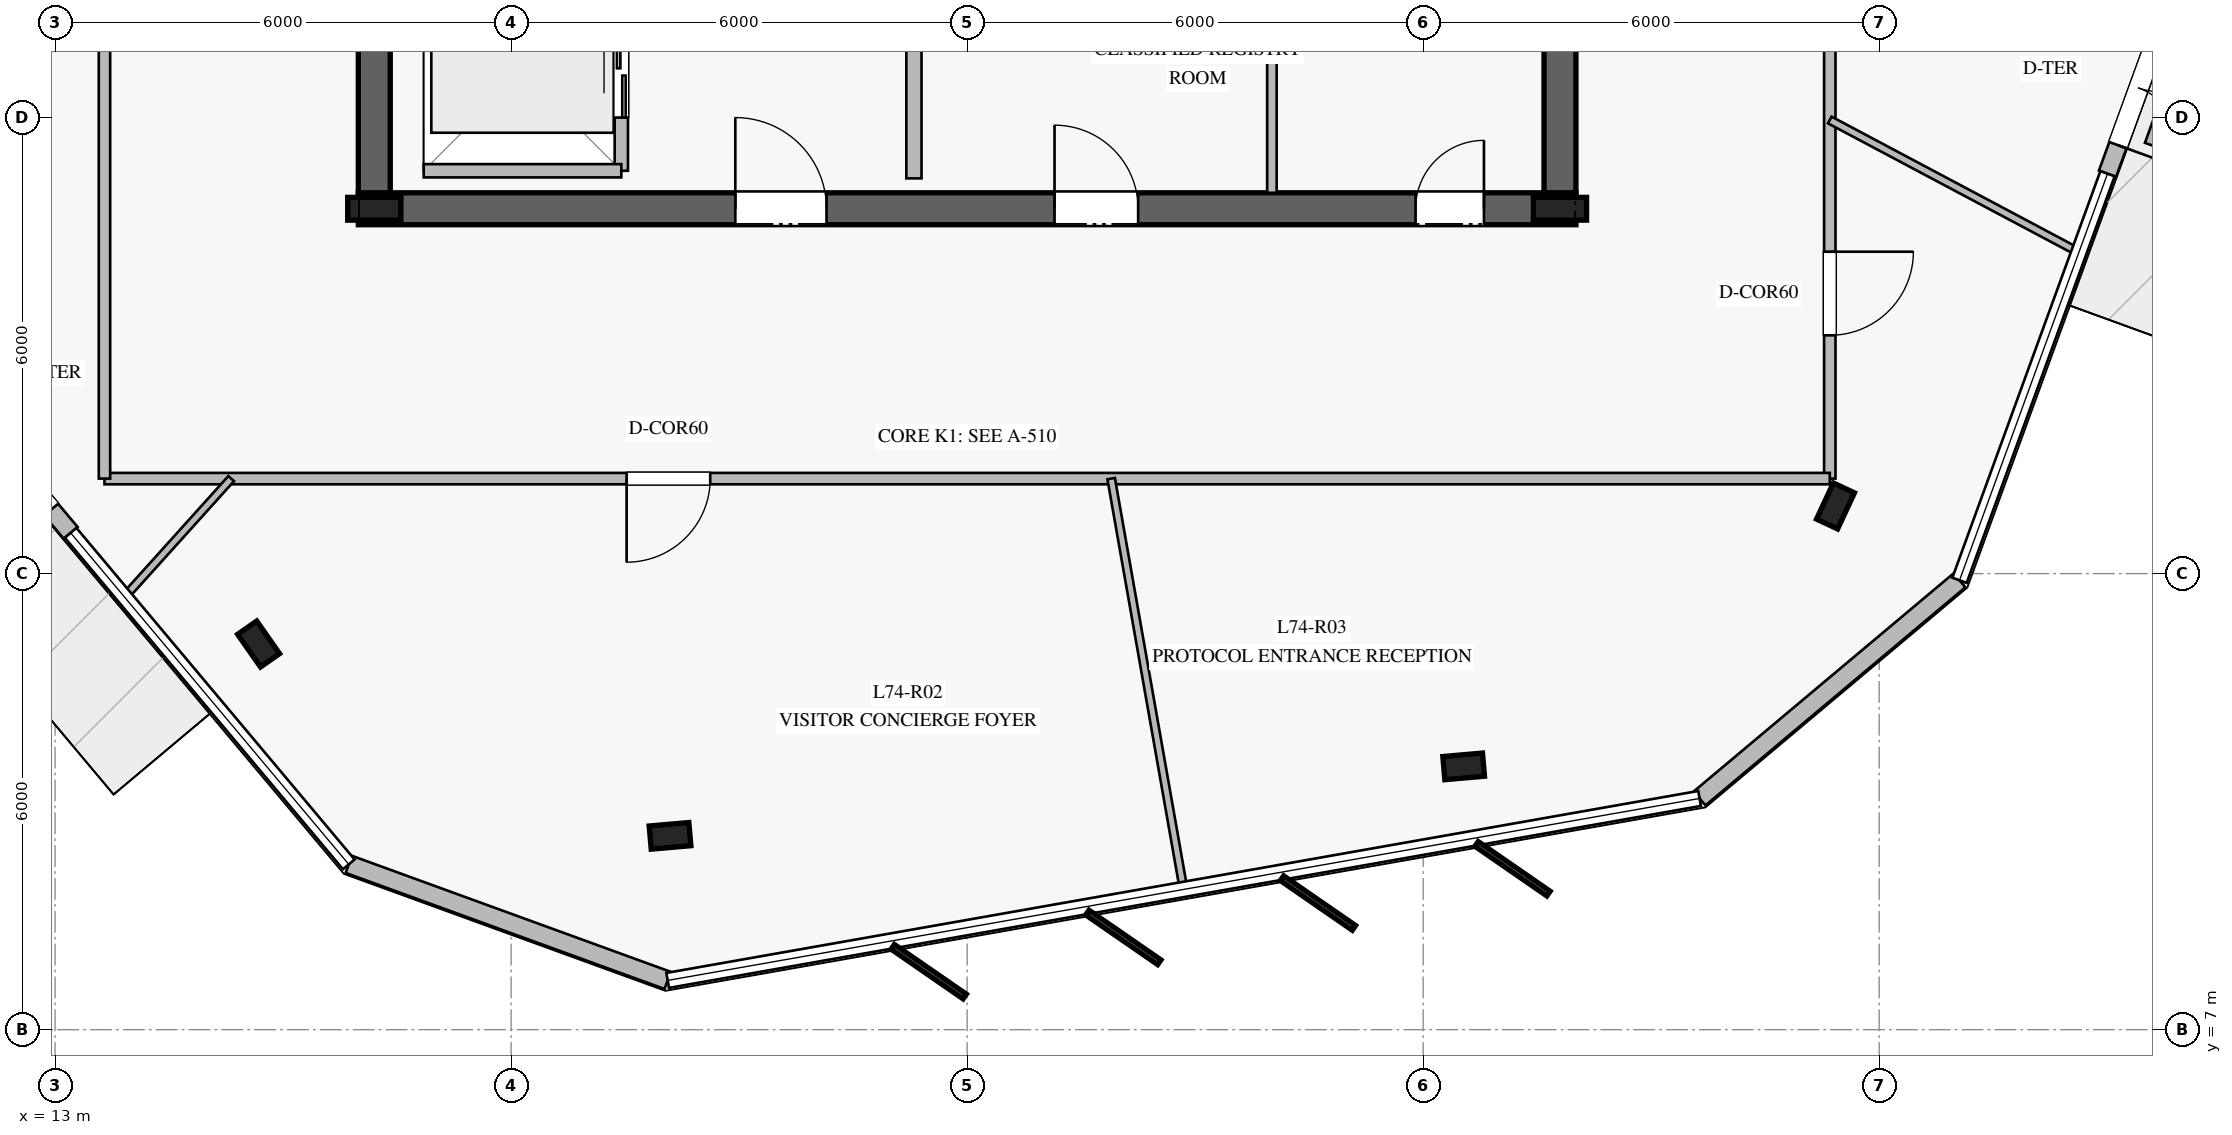
"""IFC4 building model, lengths in metres.
Left out: names, types, materials, properties, quantities, classifications, styles, units other than length and angle.
Written with IfcOpenShell. Run it as: python <this file> out.ifc"""

import sys

from ifc_helpers import new_model, si_unit, direction, frame, frame_2d, origin, origin_2d, place, context, subcontext, project, spatial, rectangle, i_section, extrude, element, fill, save


model = new_model("IFC4")
c1 = context("Model", 3, precision=1e-05, world=origin(), true_north=direction((0.0, 1.0)))
c2 = subcontext(c1, "Body", "Model", "MODEL_VIEW")
j1 = project(units=[si_unit("LENGTHUNIT", "METRE"), si_unit("PLANEANGLEUNIT", "RADIAN")], contexts=[c1])
p1 = place(None, origin())
s1 = spatial("IfcSite", under=j1, at=p1, CompositionType="ELEMENT")
p2 = place(p1, origin())
s2 = spatial("IfcBuilding", under=s1, at=p2, CompositionType="ELEMENT")
p3 = place(p2, frame((0.0, 0.0, 306.2)))
s3 = spatial("IfcBuildingStorey", under=s2, at=p3, CompositionType="ELEMENT", Elevation=306.2)
p4 = place(p3, frame((16.99, 17.8, 0.0), z_axis=(0.0, 0.0, 1.0), x_axis=(1.0, 0.0, 0.0)))
e1 = element("IfcWall", 1, at=p4, inside=s3, PredefinedType="SHEAR", context=c2, shape_type="SweptSolid", body=[
    extrude(rectangle(XDim=16.02, YDim=0.42, at=frame_2d((8.01, 0.0))), origin(), (0.0, 0.0, 1.0), 3.78),
])
p5 = place(p4, frame((4.96, 0.0, 0.0)))
e2 = element("IfcOpeningElement", 2, at=p5, cuts=e1, PredefinedType="OPENING", context=c2, shape_type="SweptSolid", body=[
    extrude(rectangle(XDim=1.2, YDim=2.25, at=frame_2d((0.6, 1.125))), frame((0.0, 0.22, 0.0), z_axis=(0.0, -1.0, 0.0), x_axis=(1.0, 0.0, 0.0)), (0.0, 0.0, 1.0), 0.44),
])
p6 = place(p4, frame((13.91, 0.0, 0.0)))
e3 = element("IfcOpeningElement", 3, at=p6, cuts=e1, PredefinedType="OPENING", context=c2, shape_type="SweptSolid", body=[
    extrude(rectangle(XDim=0.9, YDim=2.1, at=frame_2d((0.45, 1.05))), frame((0.0, 0.22, 0.0), z_axis=(0.0, -1.0, 0.0), x_axis=(1.0, 0.0, 0.0)), (0.0, 0.0, 1.0), 0.44),
])
p7 = place(p4, frame((9.16, 0.0, 0.0)))
e4 = element("IfcOpeningElement", 4, at=p7, cuts=e1, PredefinedType="OPENING", context=c2, shape_type="SweptSolid", body=[
    extrude(rectangle(XDim=1.1, YDim=2.2, at=frame_2d((0.55, 1.1))), frame((0.0, 0.22, 0.0), z_axis=(0.0, -1.0, 0.0), x_axis=(1.0, 0.0, 0.0)), (0.0, 0.0, 1.0), 0.44),
])
p8 = place(p3, frame((17.2, 31.99, 0.0), z_axis=(0.0, 0.0, 1.0), x_axis=(0.0, -1.0, 0.0)))
e5 = element("IfcWall", 5, at=p8, inside=s3, PredefinedType="SHEAR", context=c2, shape_type="SweptSolid", body=[
    extrude(rectangle(XDim=13.98, YDim=0.42, at=frame_2d((6.99, 0.0))), origin(), (0.0, 0.0, 1.0), 3.78),
])
p9 = place(p8, frame((2.14, 0.0, 0.0)))
e6 = element("IfcOpeningElement", 6, at=p9, cuts=e5, PredefinedType="OPENING", context=c2, shape_type="SweptSolid", body=[
    extrude(rectangle(XDim=1.5, YDim=2.2, at=frame_2d((0.75, 1.1))), frame((0.0, 0.22, 0.0), z_axis=(0.0, -1.0, 0.0), x_axis=(1.0, 0.0, 0.0)), (0.0, 0.0, 1.0), 0.44),
])
p10 = place(p3, frame((32.8, 18.01, 0.0), z_axis=(0.0, 0.0, 1.0), x_axis=(0.0, 1.0, 0.0)))
e7 = element("IfcWall", 7, at=p10, inside=s3, PredefinedType="SHEAR", context=c2, shape_type="SweptSolid", body=[
    extrude(rectangle(XDim=13.98, YDim=0.42, at=frame_2d((6.99, 0.0))), origin(), (0.0, 0.0, 1.0), 3.78),
])
for number, where, z_axis, x_axis in (
    (8, (17.2, 17.8, 0.0), (0.0, 0.0, 1.0), (1.0, 0.0, 0.0)),
    (9, (32.8, 17.8, 0.0), (0.0, 0.0, 1.0), (1.0, 0.0, 0.0)),
):
    element("IfcColumn", number, at=place(p3, frame(where, z_axis=z_axis, x_axis=x_axis)), inside=s3, PredefinedType="COLUMN", context=c2, shape_type="SweptSolid", body=[
        extrude(i_section(OverallWidth=0.3, OverallDepth=0.7, WebThickness=0.017, FlangeThickness=0.032, at=origin_2d()), origin(), (0.0, 0.0, 1.0), 4.0),
    ])
for number, where, z_axis, x_axis in (
    (10, (15.678, 12.074, 0.0), (0.0, 0.0, 1.0), (-0.574, 0.819, 0.0)),
    (11, (21.091, 9.55, 0.0), (0.0, 0.0, 1.0), (0.996, 0.087, 0.0)),
    (12, (31.533, 10.464, 0.0), (0.0, 0.0, 1.0), (0.996, 0.087, 0.0)),
    (13, (36.425, 13.89, 0.0), (0.0, 0.0, 1.0), (0.423, 0.906, 0.0)),
):
    element("IfcColumn", number, at=place(p3, frame(where, z_axis=z_axis, x_axis=x_axis)), inside=s3, PredefinedType="COLUMN", context=c2, shape_type="SweptSolid", body=[
        extrude(i_section(OverallWidth=0.306, OverallDepth=0.524, WebThickness=0.021, FlangeThickness=0.04, at=origin_2d()), origin(), (0.0, 0.0, 1.0), 4.0),
    ])
p11 = place(p3, frame((11.663, 15.374, 0.0), z_axis=(0.0, 0.0, 1.0), x_axis=(0.642693191064, -0.766123659836, 0.0)))
e14 = element("IfcWall", 14, at=p11, inside=s3, PredefinedType="STANDARD", context=c2, shape_type="SweptSolid", body=[
    extrude(rectangle(XDim=2.399, YDim=0.24, at=frame_2d((1.2, 0.0))), origin(), (0.0, 0.0, 1.0), 3.78),
])
p12 = place(p11, frame((0.4, 0.0, 0.0)))
e15 = element("IfcOpeningElement", 15, at=p12, cuts=e14, PredefinedType="OPENING", context=c2, shape_type="SweptSolid", body=[
    extrude(rectangle(XDim=1.6, YDim=2.25, at=frame_2d((0.8, 1.125))), frame((0.0, 0.13, 0.0), z_axis=(0.0, -1.0, 0.0), x_axis=(1.0, 0.0, 0.0)), (0.0, 0.0, 1.0), 0.26),
])
p13 = place(p3, frame((16.864, 9.175, 0.0), z_axis=(0.0, 0.0, 1.0), x_axis=(0.939702397898, -0.341993279738, 0.0)))
e16 = element("IfcWall", 16, at=p13, inside=s3, PredefinedType="STANDARD", context=c2, shape_type="SweptSolid", body=[
    extrude(rectangle(XDim=4.465, YDim=0.24, at=frame_2d((2.233, 0.0))), origin(), (0.0, 0.0, 1.0), 3.78),
])
p14 = place(p3, frame((34.637, 10.042, 0.0), z_axis=(0.0, 0.0, 1.0), x_axis=(0.765993487021, 0.642848331912, 0.0)))
e17 = element("IfcWall", 17, at=p14, inside=s3, PredefinedType="STANDARD", context=c2, shape_type="SweptSolid", body=[
    extrude(rectangle(XDim=4.465, YDim=0.24, at=frame_2d((2.232, 0.0))), origin(), (0.0, 0.0, 1.0), 3.78),
])
p15 = place(p3, frame((40.004, 18.261, 0.0), z_axis=(0.0, 0.0, 1.0), x_axis=(0.341979831546, 0.939707292095, 0.0)))
e18 = element("IfcWall", 18, at=p15, inside=s3, PredefinedType="STANDARD", context=c2, shape_type="SweptSolid", body=[
    extrude(rectangle(XDim=2.401, YDim=0.24, at=frame_2d((1.2, 0.0))), origin(), (0.0, 0.0, 1.0), 3.78),
])
p16 = place(p15, frame((0.4, 0.0, 0.0)))
e19 = element("IfcOpeningElement", 19, at=p16, cuts=e18, PredefinedType="OPENING", context=c2, shape_type="SweptSolid", body=[
    extrude(rectangle(XDim=1.6, YDim=2.25, at=frame_2d((0.8, 1.125))), frame((0.0, 0.13, 0.0), z_axis=(0.0, -1.0, 0.0), x_axis=(1.0, 0.0, 0.0)), (0.0, 0.0, 1.0), 0.26),
])
p17 = place(p3, frame((40.6, 18.63, 0.0), z_axis=(0.0, 0.0, 1.0), x_axis=(0.341351063346, 0.939935876298, 0.0)))
e20 = element("IfcWall", 20, at=p17, inside=s3, PredefinedType="USERDEFINED", context=c2, shape_type="SweptSolid", body=[
    extrude(rectangle(XDim=1.3, YDim=0.22, at=frame_2d((0.65, 0.0))), origin(), (0.0, 0.0, 1.0), 0.4),
])
p18 = place(p3, frame((24.3, 18.2, 0.0), z_axis=(0.0, 0.0, 1.0), x_axis=(0.0, 1.0, 0.0)))
e21 = element("IfcWall", 21, at=p18, inside=s3, PredefinedType="PARTITIONING", context=c2, shape_type="SweptSolid", body=[
    extrude(rectangle(XDim=5.15, YDim=0.2, at=frame_2d((2.575, 0.0))), origin(), (0.0, 0.0, 1.0), 3.78),
])
p19 = place(p3, frame((29.01, 18.01, 0.0), z_axis=(0.0, 0.0, 1.0), x_axis=(0.0, 1.0, 0.0)))
e22 = element("IfcWall", 22, at=p19, inside=s3, PredefinedType="PARTITIONING", context=c2, shape_type="SweptSolid", body=[
    extrude(rectangle(XDim=2.54, YDim=0.125, at=frame_2d((1.27, 0.0))), origin(), (0.0, 0.0, 1.0), 3.78),
])
p20 = place(p3, frame((20.45, 18.3, 0.0), z_axis=(0.0, 0.0, 1.0), x_axis=(0.0, 1.0, 0.0)))
e23 = element("IfcWall", 23, at=p20, inside=s3, PredefinedType="PARTITIONING", context=c2, shape_type="SweptSolid", body=[
    extrude(rectangle(XDim=2.6, YDim=0.175, at=frame_2d((1.3, 0.0))), origin(), (0.0, 0.0, 1.0), 3.78),
])
p21 = place(p20, frame((0.7, 0.0, 0.0)))
e24 = element("IfcOpeningElement", 24, at=p21, cuts=e23, PredefinedType="OPENING", context=c2, shape_type="SweptSolid", body=[
    extrude(rectangle(XDim=1.2, YDim=2.2, at=frame_2d((0.6, 1.1))), frame((0.0, 0.098, 0.0), z_axis=(0.0, -1.0, 0.0), x_axis=(1.0, 0.0, 0.0)), (0.0, 0.0, 1.0), 0.195),
])
p22 = place(p3, frame((17.85, 18.3, 0.0), z_axis=(0.0, 0.0, 1.0), x_axis=(1.0, 0.0, 0.0)))
e25 = element("IfcWall", 25, at=p22, inside=s3, PredefinedType="PARTITIONING", context=c2, shape_type="SweptSolid", body=[
    extrude(rectangle(XDim=2.6, YDim=0.175, at=frame_2d((1.3, 0.0))), origin(), (0.0, 0.0, 1.0), 3.78),
])
p23 = place(p3, frame((36.35, 35.75, 0.0), z_axis=(0.0, 0.0, 1.0), x_axis=(0.0, -1.0, 0.0)))
e26 = element("IfcWall", 26, at=p23, inside=s3, PredefinedType="PARTITIONING", context=c2, shape_type="SweptSolid", body=[
    extrude(rectangle(XDim=21.5, YDim=0.15, at=frame_2d((10.75, 0.0))), origin(), (0.0, 0.0, 1.0), 3.25),
])
p24 = place(p23, frame((18.515, 0.0, 0.0)))
e27 = element("IfcOpeningElement", 27, at=p24, cuts=e26, PredefinedType="OPENING", context=c2, shape_type="SweptSolid", body=[
    extrude(rectangle(XDim=1.1, YDim=2.2, at=frame_2d((0.55, 1.1))), frame((0.0, 0.085, 0.0), z_axis=(0.0, -1.0, 0.0), x_axis=(1.0, 0.0, 0.0)), (0.0, 0.0, 1.0), 0.17),
])
p25 = place(p23, frame((9.663, 0.0, 0.0)))
e28 = element("IfcOpeningElement", 28, at=p25, cuts=e26, PredefinedType="OPENING", context=c2, shape_type="SweptSolid", body=[
    extrude(rectangle(XDim=1.1, YDim=2.2, at=frame_2d((0.55, 1.1))), frame((0.0, 0.085, 0.0), z_axis=(0.0, -1.0, 0.0), x_axis=(1.0, 0.0, 0.0)), (0.0, 0.0, 1.0), 0.17),
])
p26 = place(p3, frame((36.35, 14.25, 0.0), z_axis=(0.0, 0.0, 1.0), x_axis=(-1.0, 0.0, 0.0)))
e29 = element("IfcWall", 29, at=p26, inside=s3, PredefinedType="PARTITIONING", context=c2, shape_type="SweptSolid", body=[
    extrude(rectangle(XDim=22.7, YDim=0.15, at=frame_2d((11.35, 0.0))), origin(), (0.0, 0.0, 1.0), 3.28),
])
p27 = place(p26, frame((14.73, 0.0, 0.0)))
e30 = element("IfcOpeningElement", 30, at=p27, cuts=e29, PredefinedType="OPENING", context=c2, shape_type="SweptSolid", body=[
    extrude(rectangle(XDim=1.1, YDim=2.2, at=frame_2d((0.55, 1.1))), frame((0.0, 0.085, 0.0), z_axis=(0.0, -1.0, 0.0), x_axis=(1.0, 0.0, 0.0)), (0.0, 0.0, 1.0), 0.17),
])
p28 = place(p3, frame((13.65, 14.25, 0.0), z_axis=(0.0, 0.0, 1.0), x_axis=(0.0, 1.0, 0.0)))
e31 = element("IfcWall", 31, at=p28, inside=s3, PredefinedType="PARTITIONING", context=c2, shape_type="SweptSolid", body=[
    extrude(rectangle(XDim=21.5, YDim=0.15, at=frame_2d((10.75, 0.0))), origin(), (0.0, 0.0, 1.0), 3.25),
])
p29 = place(p28, frame((5.914, 0.0, 0.0)))
e32 = element("IfcOpeningElement", 32, at=p29, cuts=e31, PredefinedType="OPENING", context=c2, shape_type="SweptSolid", body=[
    extrude(rectangle(XDim=1.1, YDim=2.2, at=frame_2d((0.55, 1.1))), frame((0.0, 0.085, 0.0), z_axis=(0.0, -1.0, 0.0), x_axis=(1.0, 0.0, 0.0)), (0.0, 0.0, 1.0), 0.17),
])
p30 = place(p3, frame((15.317, 14.25, 0.0), z_axis=(0.0, 0.0, 1.0), x_axis=(-0.669366537032, -0.742932324712, 0.0)))
e33 = element("IfcWall", 33, at=p30, inside=s3, PredefinedType="MOVABLE", context=c2, shape_type="SweptSolid", body=[
    extrude(rectangle(XDim=2.081, YDim=0.1, at=frame_2d((1.041, 0.0))), origin(), (0.0, 0.0, 1.0), 3.28),
])
p31 = place(p3, frame((26.895, 14.25, 0.0), z_axis=(0.0, 0.0, 1.0), x_axis=(0.173744618564, -0.984790743011, 0.0)))
e34 = element("IfcWall", 34, at=p31, inside=s3, PredefinedType="MOVABLE", context=c2, shape_type="SweptSolid", body=[
    extrude(rectangle(XDim=5.473, YDim=0.1, at=frame_2d((2.737, 0.0))), origin(), (0.0, 0.0, 1.0), 3.28),
])
p32 = place(p3, frame((36.35, 18.968, 0.0), z_axis=(0.0, 0.0, 1.0), x_axis=(0.883037861364, -0.469301753031, 0.0)))
e35 = element("IfcWall", 35, at=p32, inside=s3, PredefinedType="MOVABLE", context=c2, shape_type="SweptSolid", body=[
    extrude(rectangle(XDim=3.695, YDim=0.1, at=frame_2d((1.848, 0.0))), origin(), (0.0, 0.0, 1.0), 3.28),
])
p33 = place(p12, frame((1.6, 0.0, 0.0), z_axis=(0.0, 0.0, 1.0), x_axis=(-1.0, 0.0, 0.0)))
e36 = element("IfcDoor", 36, at=p33, inside=s3, OperationType="DOUBLE_DOOR_SINGLE_SWING", PredefinedType="DOOR", context=c2, shape_type="SweptSolid", body=[
    extrude(rectangle(XDim=1.6, YDim=2.25, at=frame_2d((0.8, 1.125))), frame((0.0, 0.025, 0.0), z_axis=(0.0, -1.0, 0.0), x_axis=(1.0, 0.0, 0.0)), (0.0, 0.0, 1.0), 0.05),
])
fill(e15, e36)
p34 = place(p16, frame((1.6, 0.0, 0.0), z_axis=(0.0, 0.0, 1.0), x_axis=(-1.0, 0.0, 0.0)))
e37 = element("IfcDoor", 37, at=p34, inside=s3, OperationType="DOUBLE_DOOR_SINGLE_SWING", PredefinedType="DOOR", context=c2, shape_type="SweptSolid", body=[
    extrude(rectangle(XDim=1.6, YDim=2.25, at=frame_2d((0.8, 1.125))), frame((0.0, 0.025, 0.0), z_axis=(0.0, -1.0, 0.0), x_axis=(1.0, 0.0, 0.0)), (0.0, 0.0, 1.0), 0.05),
])
fill(e19, e37)
p35 = place(p5, origin())
e38 = element("IfcDoor", 38, at=p35, inside=s3, OperationType="SINGLE_SWING_LEFT", PredefinedType="DOOR", context=c2, shape_type="SweptSolid", body=[
    extrude(rectangle(XDim=1.2, YDim=2.25, at=frame_2d((0.6, 1.125))), frame((0.0, 0.025, 0.0), z_axis=(0.0, -1.0, 0.0), x_axis=(1.0, 0.0, 0.0)), (0.0, 0.0, 1.0), 0.05),
])
fill(e2, e38)
p36 = place(p6, origin())
e39 = element("IfcDoor", 39, at=p36, inside=s3, OperationType="SINGLE_SWING_RIGHT", PredefinedType="DOOR", context=c2, shape_type="SweptSolid", body=[
    extrude(rectangle(XDim=0.9, YDim=2.1, at=frame_2d((0.45, 1.05))), frame((0.0, 0.025, 0.0), z_axis=(0.0, -1.0, 0.0), x_axis=(1.0, 0.0, 0.0)), (0.0, 0.0, 1.0), 0.05),
])
fill(e3, e39)
p37 = place(p7, origin())
e40 = element("IfcDoor", 40, at=p37, inside=s3, OperationType="SINGLE_SWING_LEFT", PredefinedType="DOOR", context=c2, shape_type="SweptSolid", body=[
    extrude(rectangle(XDim=1.1, YDim=2.2, at=frame_2d((0.55, 1.1))), frame((0.0, 0.025, 0.0), z_axis=(0.0, -1.0, 0.0), x_axis=(1.0, 0.0, 0.0)), (0.0, 0.0, 1.0), 0.05),
])
fill(e4, e40)
p38 = place(p21, origin())
e41 = element("IfcDoor", 41, at=p38, inside=s3, OperationType="DOUBLE_DOOR_SLIDING", PredefinedType="DOOR", context=c2, shape_type="SweptSolid", body=[
    extrude(rectangle(XDim=1.2, YDim=2.2, at=frame_2d((0.6, 1.1))), frame((0.0, 0.025, 0.0), z_axis=(0.0, -1.0, 0.0), x_axis=(1.0, 0.0, 0.0)), (0.0, 0.0, 1.0), 0.05),
])
fill(e24, e41)
p39 = place(p27, origin())
e42 = element("IfcDoor", 42, at=p39, inside=s3, OperationType="SINGLE_SWING_RIGHT", PredefinedType="DOOR", context=c2, shape_type="SweptSolid", body=[
    extrude(rectangle(XDim=1.1, YDim=2.2, at=frame_2d((0.55, 1.1))), frame((0.0, 0.025, 0.0), z_axis=(0.0, -1.0, 0.0), x_axis=(1.0, 0.0, 0.0)), (0.0, 0.0, 1.0), 0.05),
])
fill(e30, e42)
p40 = place(p24, origin())
e43 = element("IfcDoor", 43, at=p40, inside=s3, OperationType="SINGLE_SWING_LEFT", PredefinedType="DOOR", context=c2, shape_type="SweptSolid", body=[
    extrude(rectangle(XDim=1.1, YDim=2.2, at=frame_2d((0.55, 1.1))), frame((0.0, 0.025, 0.0), z_axis=(0.0, -1.0, 0.0), x_axis=(1.0, 0.0, 0.0)), (0.0, 0.0, 1.0), 0.05),
])
fill(e27, e43)
save(model, sys.argv[1])
